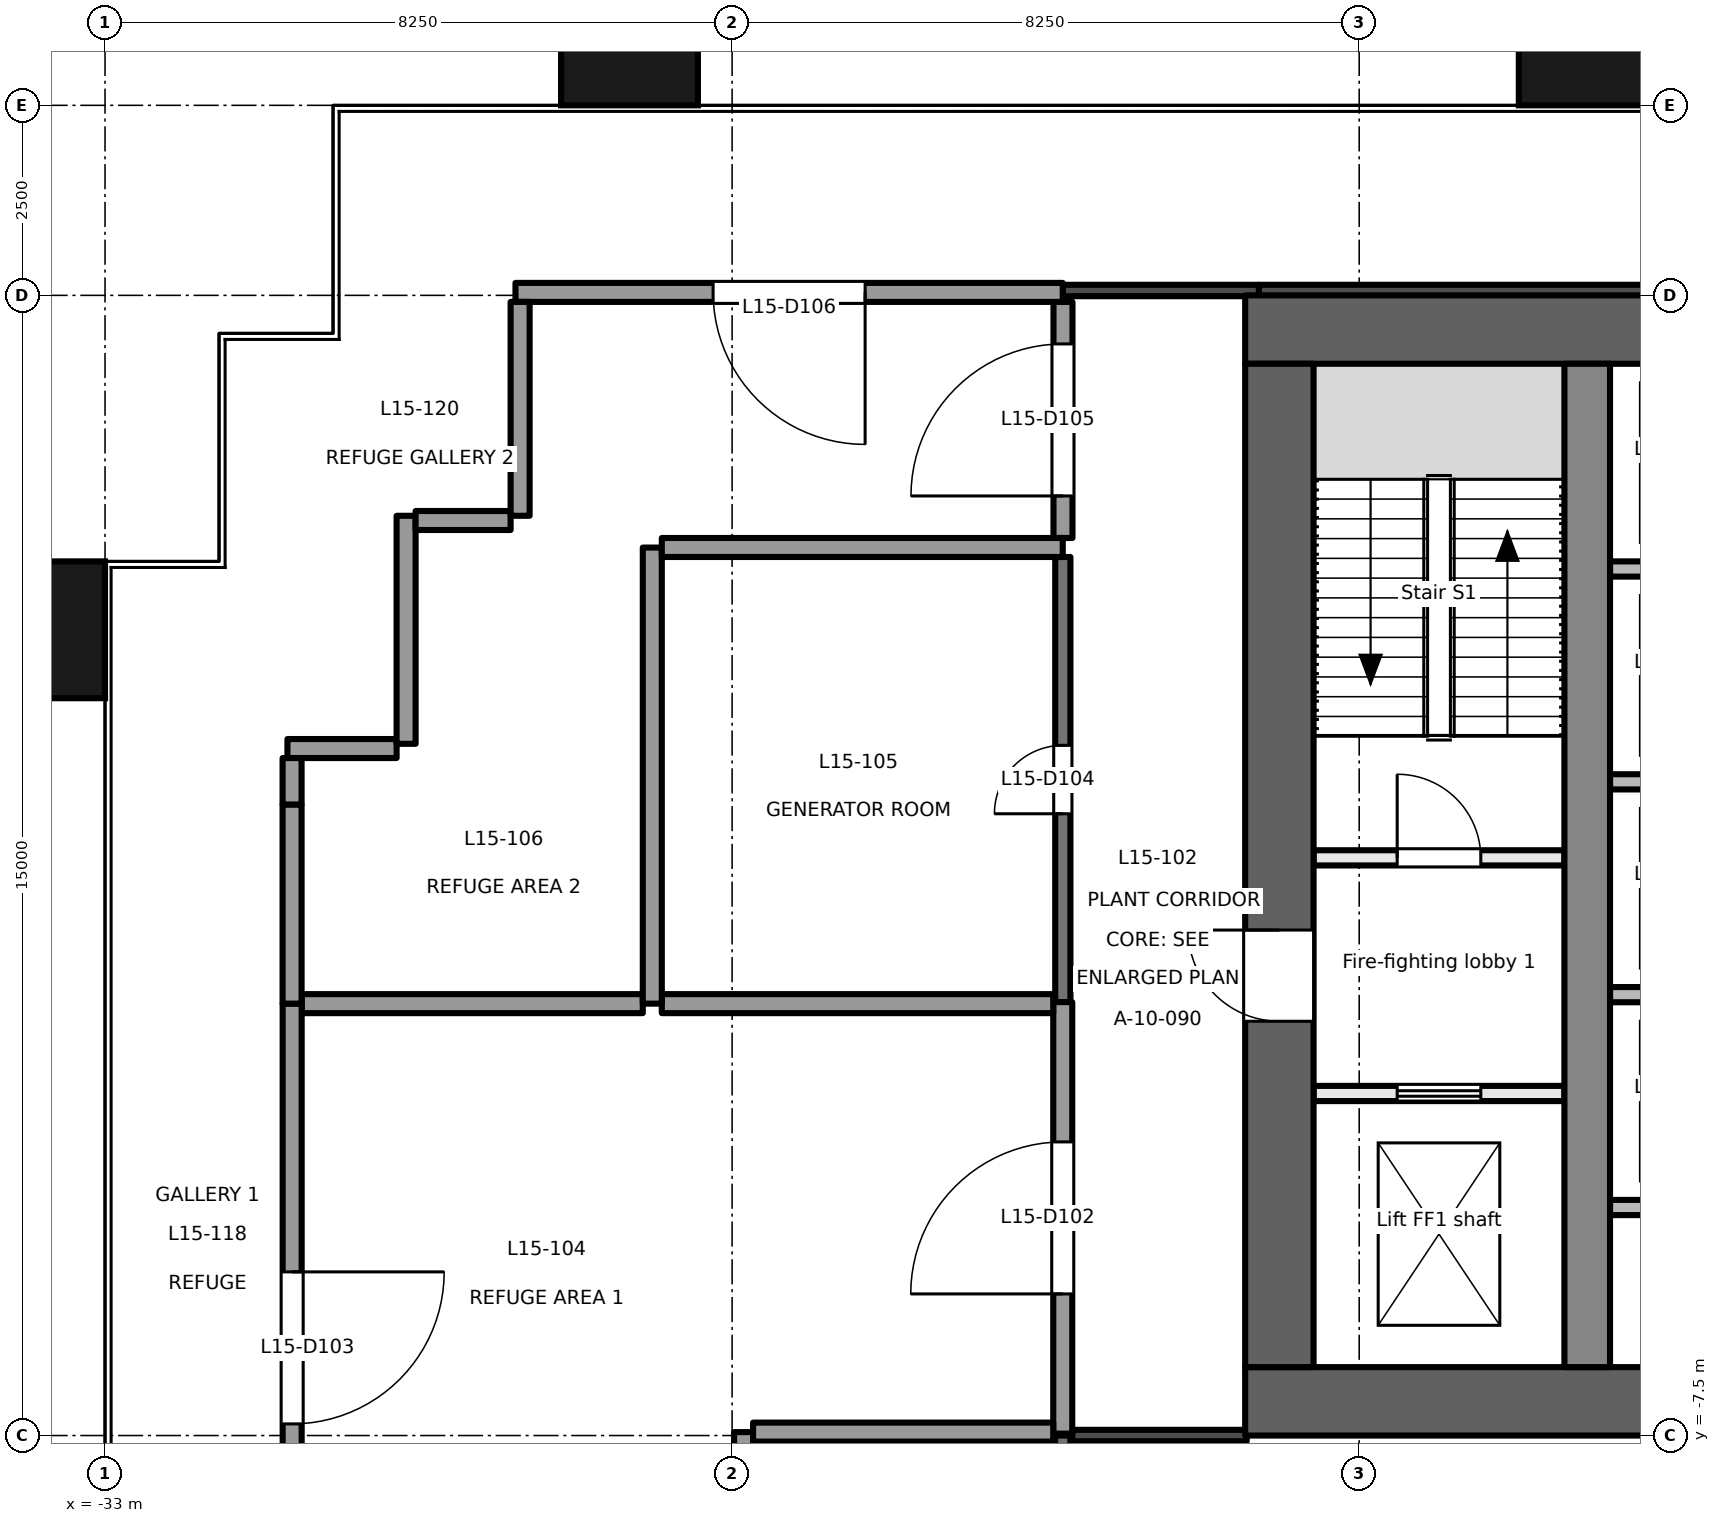
"""IFC4 building model, lengths in metres.
Left out: names, types, materials, properties, quantities, classifications, styles, units other than length and angle.
Written with IfcOpenShell. Run it as: python <this file> out.ifc"""

import sys

from ifc_helpers import new_model, si_unit, direction, frame, frame_2d, origin, origin_2d, place, context, subcontext, project, spatial, rectangle, extrude, element, fill, save


model = new_model("IFC4")
c1 = context("Model", 3, precision=1e-05, world=origin(), true_north=direction((0.0, 1.0)))
c2 = subcontext(c1, "Body", "Model", "MODEL_VIEW")
j1 = project(units=[si_unit("LENGTHUNIT", "METRE"), si_unit("PLANEANGLEUNIT", "RADIAN")], contexts=[c1])
p1 = place(None, origin())
s1 = spatial("IfcSite", under=j1, at=p1, CompositionType="ELEMENT")
p2 = place(p1, origin())
s2 = spatial("IfcBuilding", under=s1, at=p2, CompositionType="ELEMENT")
p3 = place(p2, frame((0.0, 0.0, 69.3)))
s3 = spatial("IfcBuildingStorey", under=s2, at=p3, CompositionType="ELEMENT", Elevation=69.3)
for number, where, z_axis, x_axis in (
    (1, (-33.9, 3.1, -0.2), (0.0, 0.0, 1.0), (0.0, 1.0, 0.0)),
    (2, (-26.1, 10.9, -0.2), (0.0, 0.0, 1.0), (1.0, 0.0, 0.0)),
    (3, (-13.5, 10.9, -0.2), (0.0, 0.0, 1.0), (1.0, 0.0, 0.0)),
):
    element("IfcColumn", number, at=place(p3, frame(where, z_axis=z_axis, x_axis=x_axis)), inside=s3, PredefinedType="COLUMN", context=c2, shape_type="SweptSolid", body=[
        extrude(rectangle(XDim=1.8, YDim=1.8, at=origin_2d()), origin(), (0.0, 0.0, 1.0), 5.0),
    ])
p4 = place(p3, frame((-18.0, -7.05, -0.2), z_axis=(0.0, 0.0, 1.0), x_axis=(1.0, 0.0, 0.0)))
e4 = element("IfcWall", 4, at=p4, inside=s3, PredefinedType="SHEAR", context=c2, shape_type="SweptSolid", body=[
    extrude(rectangle(XDim=36.0, YDim=0.9, at=frame_2d((18.0, 0.0))), origin(), (0.0, 0.0, 1.0), 5.0),
])
p5 = place(p4, frame((7.8, 0.0, 0.2)))
e5 = element("IfcOpeningElement", 5, at=p5, cuts=e4, PredefinedType="OPENING", context=c2, shape_type="SweptSolid", body=[
    extrude(rectangle(XDim=2.4, YDim=2.1, at=frame_2d((1.2, 1.05))), frame((0.0, 0.46, 0.0), z_axis=(0.0, -1.0, 0.0), x_axis=(1.0, 0.0, 0.0)), (0.0, 0.0, 1.0), 0.921),
])
p6 = place(p4, frame((17.4, 0.0, 0.2)))
e6 = element("IfcOpeningElement", 6, at=p6, cuts=e4, PredefinedType="OPENING", context=c2, shape_type="SweptSolid", body=[
    extrude(rectangle(XDim=1.2, YDim=2.1, at=frame_2d((0.6, 1.05))), frame((0.0, 0.46, 0.0), z_axis=(0.0, -1.0, 0.0), x_axis=(1.0, 0.0, 0.0)), (0.0, 0.0, 1.0), 0.921),
])
p7 = place(p4, frame((26.1, 0.0, 0.2)))
e7 = element("IfcOpeningElement", 7, at=p7, cuts=e4, PredefinedType="OPENING", context=c2, shape_type="SweptSolid", body=[
    extrude(rectangle(XDim=2.4, YDim=2.1, at=frame_2d((1.2, 1.05))), frame((0.0, 0.46, 0.0), z_axis=(0.0, -1.0, 0.0), x_axis=(1.0, 0.0, 0.0)), (0.0, 0.0, 1.0), 0.921),
])
p8 = place(p3, frame((-18.0, 7.05, -0.2), z_axis=(0.0, 0.0, 1.0), x_axis=(1.0, 0.0, 0.0)))
e8 = element("IfcWall", 8, at=p8, inside=s3, PredefinedType="SHEAR", context=c2, shape_type="SweptSolid", body=[
    extrude(rectangle(XDim=36.0, YDim=0.9, at=frame_2d((18.0, 0.0))), origin(), (0.0, 0.0, 1.0), 5.0),
])
p9 = place(p3, frame((-17.55, -6.6, -0.2), z_axis=(0.0, 0.0, 1.0), x_axis=(0.0, 1.0, 0.0)))
e9 = element("IfcWall", 9, at=p9, inside=s3, PredefinedType="SHEAR", context=c2, shape_type="SweptSolid", body=[
    extrude(rectangle(XDim=13.2, YDim=0.9, at=frame_2d((6.6, 0.0))), origin(), (0.0, 0.0, 1.0), 5.0),
])
p10 = place(p9, frame((4.55, 0.0, 0.2)))
e10 = element("IfcOpeningElement", 10, at=p10, cuts=e9, PredefinedType="OPENING", context=c2, shape_type="SweptSolid", body=[
    extrude(rectangle(XDim=1.2, YDim=2.1, at=frame_2d((0.6, 1.05))), frame((0.0, 0.46, 0.0), z_axis=(0.0, -1.0, 0.0), x_axis=(1.0, 0.0, 0.0)), (0.0, 0.0, 1.0), 0.921),
])
p11 = place(p3, frame((-13.5, -6.6, -0.2), z_axis=(0.0, 0.0, 1.0), x_axis=(0.0, 1.0, 0.0)))
e11 = element("IfcWall", 11, at=p11, inside=s3, PredefinedType="SHEAR", context=c2, shape_type="SweptSolid", body=[
    extrude(rectangle(XDim=13.2, YDim=0.6, at=frame_2d((6.6, 0.0))), origin(), (0.0, 0.0, 1.0), 5.0),
])
p12 = place(p3, frame((-17.1, -3.0, 0.0), z_axis=(0.0, 0.0, 1.0), x_axis=(1.0, 0.0, 0.0)))
e12 = element("IfcWall", 12, at=p12, inside=s3, PredefinedType="PARTITIONING", context=c2, shape_type="SweptSolid", body=[
    extrude(rectangle(XDim=3.3, YDim=0.2, at=frame_2d((1.65, 0.0))), origin(), (0.0, 0.0, 1.0), 4.8),
])
p13 = place(p12, frame((1.1, 0.0, 0.0)))
e13 = element("IfcOpeningElement", 13, at=p13, cuts=e12, PredefinedType="OPENING", context=c2, shape_type="SweptSolid", body=[
    extrude(rectangle(XDim=1.1, YDim=2.1, at=frame_2d((0.55, 1.05))), frame((0.0, 0.111, 0.0), z_axis=(0.0, -1.0, 0.0), x_axis=(1.0, 0.0, 0.0)), (0.0, 0.0, 1.0), 0.221),
])
p14 = place(p3, frame((-17.1, 0.1, 0.0), z_axis=(0.0, 0.0, 1.0), x_axis=(1.0, 0.0, 0.0)))
e14 = element("IfcWall", 14, at=p14, inside=s3, PredefinedType="PARTITIONING", context=c2, shape_type="SweptSolid", body=[
    extrude(rectangle(XDim=3.3, YDim=0.2, at=frame_2d((1.65, 0.0))), origin(), (0.0, 0.0, 1.0), 4.8),
])
p15 = place(p14, frame((1.1, 0.0, 0.0)))
e15 = element("IfcOpeningElement", 15, at=p15, cuts=e14, PredefinedType="OPENING", context=c2, shape_type="SweptSolid", body=[
    extrude(rectangle(XDim=1.1, YDim=2.1, at=frame_2d((0.55, 1.05))), frame((0.0, 0.111, 0.0), z_axis=(0.0, -1.0, 0.0), x_axis=(1.0, 0.0, 0.0)), (0.0, 0.0, 1.0), 0.221),
])
for number, where, z_axis, x_axis in (
    (16, (-13.2, -1.7, 0.0), (0.0, 0.0, 1.0), (1.0, 0.0, 0.0)),
    (17, (-13.2, 1.1, 0.0), (0.0, 0.0, 1.0), (1.0, 0.0, 0.0)),
    (18, (-13.2, 3.9, 0.0), (0.0, 0.0, 1.0), (1.0, 0.0, 0.0)),
    (19, (-13.2, -4.5, 0.0), (0.0, 0.0, 1.0), (1.0, 0.0, 0.0)),
):
    element("IfcWall", number, at=place(p3, frame(where, z_axis=z_axis, x_axis=x_axis)), inside=s3, PredefinedType="PARTITIONING", context=c2, shape_type="SweptSolid", body=[
        extrude(rectangle(XDim=2.3, YDim=0.2, at=frame_2d((1.15, 0.0))), origin(), (0.0, 0.0, 1.0), 4.8),
    ])
p16 = place(p3, frame((-20.275, -7.5, 0.0), z_axis=(0.0, 0.0, 1.0), x_axis=(1.0, 0.0, 0.0)))
e20 = element("IfcWall", 20, at=p16, inside=s3, PredefinedType="PARTITIONING", context=c2, shape_type="SweptSolid", body=[
    extrude(rectangle(XDim=2.295, YDim=0.15, at=frame_2d((1.147, 0.0))), origin(), (0.0, 0.0, 1.0), 2.15),
])
p17 = place(p3, frame((-20.4, -10.675, 0.0), z_axis=(0.0, 0.0, 1.0), x_axis=(0.0, 1.0, 0.0)))
e21 = element("IfcWall", 21, at=p17, inside=s3, PredefinedType="PARTITIONING", context=c2, shape_type="SweptSolid", body=[
    extrude(rectangle(XDim=3.175, YDim=0.2, at=frame_2d((1.587, 0.0))), origin(), (0.0, 0.0, 1.0), 4.4),
])
p18 = place(p17, frame((1.137, 0.0, 0.0)))
e22 = element("IfcOpeningElement", 22, at=p18, cuts=e21, PredefinedType="OPENING", context=c2, shape_type="SweptSolid", body=[
    extrude(rectangle(XDim=0.9, YDim=2.1, at=frame_2d((0.45, 1.05))), frame((0.0, 0.111, 0.0), z_axis=(0.0, -1.0, 0.0), x_axis=(1.0, 0.0, 0.0)), (0.0, 0.0, 1.0), 0.221),
])
p19 = place(p3, frame((-20.4, -7.475, 0.0), z_axis=(0.0, 0.0, 1.0), x_axis=(0.0, 1.0, 0.0)))
e23 = element("IfcWall", 23, at=p19, inside=s3, PredefinedType="PARTITIONING", context=c2, shape_type="SweptSolid", body=[
    extrude(rectangle(XDim=5.677, YDim=0.25, at=frame_2d((2.838, 0.0))), origin(), (0.0, 0.0, 1.0), 4.4),
])
p20 = place(p19, frame((1.838, 0.0, 0.0)))
e24 = element("IfcOpeningElement", 24, at=p20, cuts=e23, PredefinedType="OPENING", context=c2, shape_type="SweptSolid", body=[
    extrude(rectangle(XDim=2.0, YDim=2.1, at=frame_2d((1.0, 1.05))), frame((0.0, 0.135, 0.0), z_axis=(0.0, -1.0, 0.0), x_axis=(1.0, 0.0, 0.0)), (0.0, 0.0, 1.0), 0.271),
])
p21 = place(p3, frame((-20.399, -1.798, 0.0), z_axis=(0.0, 0.0, 1.0), x_axis=(0.0, 1.0, 0.0)))
e25 = element("IfcWall", 25, at=p21, inside=s3, PredefinedType="PARTITIONING", context=c2, shape_type="SweptSolid", body=[
    extrude(rectangle(XDim=5.856, YDim=0.2, at=frame_2d((2.928, 0.0))), origin(), (0.0, 0.0, 1.0), 2.75),
])
p22 = place(p21, frame((2.478, 0.0, 0.0)))
e26 = element("IfcOpeningElement", 26, at=p22, cuts=e25, PredefinedType="OPENING", context=c2, shape_type="SweptSolid", body=[
    extrude(rectangle(XDim=0.9, YDim=2.1, at=frame_2d((0.45, 1.05))), frame((0.0, 0.111, 0.0), z_axis=(0.0, -1.0, 0.0), x_axis=(1.0, 0.0, 0.0)), (0.0, 0.0, 1.0), 0.221),
])
p23 = place(p3, frame((-20.397, 4.308, 0.0), z_axis=(0.0, 0.0, 1.0), x_axis=(0.0, 1.0, 0.0)))
e27 = element("IfcWall", 27, at=p23, inside=s3, PredefinedType="PARTITIONING", context=c2, shape_type="SweptSolid", body=[
    extrude(rectangle(XDim=3.106, YDim=0.25, at=frame_2d((1.553, 0.0))), origin(), (0.0, 0.0, 1.0), 4.4),
])
p24 = place(p23, frame((0.553, 0.0, 0.0)))
e28 = element("IfcOpeningElement", 28, at=p24, cuts=e27, PredefinedType="OPENING", context=c2, shape_type="SweptSolid", body=[
    extrude(rectangle(XDim=2.0, YDim=2.1, at=frame_2d((1.0, 1.05))), frame((0.0, 0.135, 0.0), z_axis=(0.0, -1.0, 0.0), x_axis=(1.0, 0.0, 0.0)), (0.0, 0.0, 1.0), 0.271),
])
p25 = place(p3, frame((-17.82, 7.564, 0.0), z_axis=(0.0, 0.0, 1.0), x_axis=(1.0, 0.0, 0.0)))
e29 = element("IfcWall", 29, at=p25, inside=s3, PredefinedType="PARTITIONING", context=c2, shape_type="SweptSolid", body=[
    extrude(rectangle(XDim=38.12, YDim=0.15, at=frame_2d((19.06, 0.0))), origin(), (0.0, 0.0, 1.0), 2.75),
])
p26 = place(p3, frame((-20.4, 7.564, 0.0), z_axis=(0.0, 0.0, 1.0), x_axis=(1.0, 0.0, 0.0)))
e30 = element("IfcWall", 30, at=p26, inside=s3, PredefinedType="PARTITIONING", context=c2, shape_type="SweptSolid", body=[
    extrude(rectangle(XDim=2.58, YDim=0.15, at=frame_2d((1.29, 0.0))), origin(), (0.0, 0.0, 1.0), 2.75),
])
p27 = place(p3, frame((-24.599, -13.329, 0.0), z_axis=(0.0, 0.0, 1.0), x_axis=(0.0, 1.0, 0.0)))
e31 = element("IfcWall", 31, at=p27, inside=s3, PredefinedType="PARTITIONING", context=c2, shape_type="SweptSolid", body=[
    extrude(rectangle(XDim=5.874, YDim=0.25, at=frame_2d((2.937, 0.0))), origin(), (0.0, 0.0, 1.0), 2.75),
])
p28 = place(p3, frame((-24.474, -7.455, 0.0), z_axis=(0.0, 0.0, 1.0), x_axis=(1.0, 0.0, 0.0)))
e32 = element("IfcWall", 32, at=p28, inside=s3, PredefinedType="PARTITIONING", context=c2, shape_type="SweptSolid", body=[
    extrude(rectangle(XDim=3.949, YDim=0.25, at=frame_2d((1.975, 0.0))), origin(), (0.0, 0.0, 1.0), 4.8),
])
p29 = place(p3, frame((-25.675, -1.818, 0.0), z_axis=(0.0, 0.0, 1.0), x_axis=(1.0, 0.0, 0.0)))
e33 = element("IfcWall", 33, at=p29, inside=s3, PredefinedType="PARTITIONING", context=c2, shape_type="SweptSolid", body=[
    extrude(rectangle(XDim=5.15, YDim=0.25, at=frame_2d((2.575, 0.0))), origin(), (0.0, 0.0, 1.0), 4.8),
])
p30 = place(p3, frame((-30.413, -1.818, 0.0), z_axis=(0.0, 0.0, 1.0), x_axis=(1.0, 0.0, 0.0)))
e34 = element("IfcWall", 34, at=p30, inside=s3, PredefinedType="PARTITIONING", context=c2, shape_type="SweptSolid", body=[
    extrude(rectangle(XDim=4.488, YDim=0.25, at=frame_2d((2.244, 0.0))), origin(), (0.0, 0.0, 1.0), 3.7),
])
p31 = place(p3, frame((-30.538, -1.818, 0.0), z_axis=(0.0, 0.0, 1.0), x_axis=(0.0, -1.0, 0.0)))
e35 = element("IfcWall", 35, at=p31, inside=s3, PredefinedType="PARTITIONING", context=c2, shape_type="SweptSolid", body=[
    extrude(rectangle(XDim=9.057, YDim=0.25, at=frame_2d((4.528, 0.0))), origin(), (0.0, 0.0, 1.0), 4.8),
])
p32 = place(p31, frame((3.529, 0.0, 0.0)))
e36 = element("IfcOpeningElement", 36, at=p32, cuts=e35, PredefinedType="OPENING", context=c2, shape_type="SweptSolid", body=[
    extrude(rectangle(XDim=2.0, YDim=2.1, at=frame_2d((1.0, 1.05))), frame((0.0, 0.135, 0.0), z_axis=(0.0, -1.0, 0.0), x_axis=(1.0, 0.0, 0.0)), (0.0, 0.0, 1.0), 0.271),
])
p33 = place(p3, frame((-25.8, -1.818, 0.0), z_axis=(0.0, 0.0, 1.0), x_axis=(0.0, 1.0, 0.0)))
e37 = element("IfcWall", 37, at=p33, inside=s3, PredefinedType="PARTITIONING", context=c2, shape_type="SweptSolid", body=[
    extrude(rectangle(XDim=6.0, YDim=0.25, at=frame_2d((3.0, 0.0))), origin(), (0.0, 0.0, 1.0), 2.75),
])
p34 = place(p3, frame((-25.675, 4.183, 0.0), z_axis=(0.0, 0.0, 1.0), x_axis=(1.0, 0.0, 0.0)))
e38 = element("IfcWall", 38, at=p34, inside=s3, PredefinedType="PARTITIONING", context=c2, shape_type="SweptSolid", body=[
    extrude(rectangle(XDim=5.275, YDim=0.25, at=frame_2d((2.638, 0.0))), origin(), (0.0, 0.0, 1.0), 4.8),
])
p35 = place(p3, frame((-30.539, -1.818, 0.0), z_axis=(0.0, 0.0, 1.0), x_axis=(0.0, 1.0, 0.0)))
e39 = element("IfcWall", 39, at=p35, inside=s3, PredefinedType="PARTITIONING", context=c2, shape_type="SweptSolid", body=[
    extrude(rectangle(XDim=2.62, YDim=0.25, at=frame_2d((1.31, 0.0))), origin(), (0.0, 0.0, 1.0), 4.8),
])
p36 = place(p3, frame((-30.6, 1.538, 0.0), z_axis=(0.0, 0.0, 1.0), x_axis=(1.0, 0.0, 0.0)))
e40 = element("IfcWall", 40, at=p36, inside=s3, PredefinedType="PARTITIONING", context=c2, shape_type="SweptSolid", body=[
    extrude(rectangle(XDim=1.436, YDim=0.25, at=frame_2d((0.718, 0.0))), origin(), (0.0, 0.0, 1.0), 4.8),
])
p37 = place(p3, frame((-30.539, 0.802, 0.0), z_axis=(0.0, 0.0, 1.0), x_axis=(0.0, 1.0, 0.0)))
e41 = element("IfcWall", 41, at=p37, inside=s3, PredefinedType="PARTITIONING", context=c2, shape_type="SweptSolid", body=[
    extrude(rectangle(XDim=0.611, YDim=0.25, at=frame_2d((0.306, 0.0))), origin(), (0.0, 0.0, 1.0), 4.8),
])
p38 = place(p3, frame((-29.039, 1.6, 0.0), z_axis=(0.0, 0.0, 1.0), x_axis=(0.0, 1.0, 0.0)))
e42 = element("IfcWall", 42, at=p38, inside=s3, PredefinedType="PARTITIONING", context=c2, shape_type="SweptSolid", body=[
    extrude(rectangle(XDim=3.0, YDim=0.25, at=frame_2d((1.5, 0.0))), origin(), (0.0, 0.0, 1.0), 2.75),
])
p39 = place(p3, frame((-28.914, 4.538, 0.0), z_axis=(0.0, 0.0, 1.0), x_axis=(1.0, 0.0, 0.0)))
e43 = element("IfcWall", 43, at=p39, inside=s3, PredefinedType="PARTITIONING", context=c2, shape_type="SweptSolid", body=[
    extrude(rectangle(XDim=1.25, YDim=0.25, at=frame_2d((0.625, 0.0))), origin(), (0.0, 0.0, 1.0), 4.8),
])
p40 = place(p3, frame((-20.4, 7.539, 0.0), z_axis=(0.0, 0.0, 1.0), x_axis=(-1.0, 0.0, 0.0)))
e44 = element("IfcWall", 44, at=p40, inside=s3, PredefinedType="PARTITIONING", context=c2, shape_type="SweptSolid", body=[
    extrude(rectangle(XDim=7.2, YDim=0.25, at=frame_2d((3.6, 0.0))), origin(), (0.0, 0.0, 1.0), 4.8),
])
p41 = place(p40, frame((2.6, 0.0, 0.0)))
e45 = element("IfcOpeningElement", 45, at=p41, cuts=e44, PredefinedType="OPENING", context=c2, shape_type="SweptSolid", body=[
    extrude(rectangle(XDim=2.0, YDim=2.1, at=frame_2d((1.0, 1.05))), frame((0.0, 0.135, 0.0), z_axis=(0.0, -1.0, 0.0), x_axis=(1.0, 0.0, 0.0)), (0.0, 0.0, 1.0), 0.271),
])
p42 = place(p3, frame((-27.539, 4.6, 0.0), z_axis=(0.0, 0.0, 1.0), x_axis=(0.0, 1.0, 0.0)))
e46 = element("IfcWall", 46, at=p42, inside=s3, PredefinedType="PARTITIONING", context=c2, shape_type="SweptSolid", body=[
    extrude(rectangle(XDim=2.814, YDim=0.25, at=frame_2d((1.407, 0.0))), origin(), (0.0, 0.0, 1.0), 4.8),
])
p43 = place(p13, origin())
e47 = element("IfcDoor", 47, at=p43, inside=s3, OperationType="DOUBLE_DOOR_SLIDING", PredefinedType="DOOR", context=c2, shape_type="SweptSolid", body=[
    extrude(rectangle(XDim=1.1, YDim=2.1, at=frame_2d((0.55, 1.05))), frame((0.0, 0.025, 0.0), z_axis=(0.0, -1.0, 0.0), x_axis=(1.0, 0.0, 0.0)), (0.0, 0.0, 1.0), 0.05),
])
fill(e13, e47)
p44 = place(p10, origin())
e48 = element("IfcDoor", 48, at=p44, inside=s3, OperationType="SINGLE_SWING_RIGHT", PredefinedType="DOOR", context=c2, shape_type="SweptSolid", body=[
    extrude(rectangle(XDim=1.2, YDim=2.1, at=frame_2d((0.6, 1.05))), frame((0.0, 0.025, 0.0), z_axis=(0.0, -1.0, 0.0), x_axis=(1.0, 0.0, 0.0)), (0.0, 0.0, 1.0), 0.05),
])
fill(e10, e48)
p45 = place(p15, origin())
e49 = element("IfcDoor", 49, at=p45, inside=s3, OperationType="SINGLE_SWING_LEFT", PredefinedType="DOOR", context=c2, shape_type="SweptSolid", body=[
    extrude(rectangle(XDim=1.1, YDim=2.1, at=frame_2d((0.55, 1.05))), frame((0.0, 0.025, 0.0), z_axis=(0.0, -1.0, 0.0), x_axis=(1.0, 0.0, 0.0)), (0.0, 0.0, 1.0), 0.05),
])
fill(e15, e49)
p46 = place(p20, origin())
e50 = element("IfcDoor", 50, at=p46, inside=s3, OperationType="DOUBLE_DOOR_SINGLE_SWING", PredefinedType="DOOR", context=c2, shape_type="SweptSolid", body=[
    extrude(rectangle(XDim=2.0, YDim=2.1, at=frame_2d((1.0, 1.05))), frame((0.0, 0.025, 0.0), z_axis=(0.0, -1.0, 0.0), x_axis=(1.0, 0.0, 0.0)), (0.0, 0.0, 1.0), 0.05),
])
fill(e24, e50)
p47 = place(p32, origin())
e51 = element("IfcDoor", 51, at=p47, inside=s3, OperationType="DOUBLE_DOOR_SINGLE_SWING", PredefinedType="DOOR", context=c2, shape_type="SweptSolid", body=[
    extrude(rectangle(XDim=2.0, YDim=2.1, at=frame_2d((1.0, 1.05))), frame((0.0, 0.025, 0.0), z_axis=(0.0, -1.0, 0.0), x_axis=(1.0, 0.0, 0.0)), (0.0, 0.0, 1.0), 0.05),
])
fill(e36, e51)
p48 = place(p22, origin())
e52 = element("IfcDoor", 52, at=p48, inside=s3, OperationType="SINGLE_SWING_LEFT", PredefinedType="DOOR", context=c2, shape_type="SweptSolid", body=[
    extrude(rectangle(XDim=0.9, YDim=2.1, at=frame_2d((0.45, 1.05))), frame((0.0, 0.025, 0.0), z_axis=(0.0, -1.0, 0.0), x_axis=(1.0, 0.0, 0.0)), (0.0, 0.0, 1.0), 0.05),
])
fill(e26, e52)
p49 = place(p24, origin())
e53 = element("IfcDoor", 53, at=p49, inside=s3, OperationType="DOUBLE_DOOR_SINGLE_SWING", PredefinedType="DOOR", context=c2, shape_type="SweptSolid", body=[
    extrude(rectangle(XDim=2.0, YDim=2.1, at=frame_2d((1.0, 1.05))), frame((0.0, 0.025, 0.0), z_axis=(0.0, -1.0, 0.0), x_axis=(1.0, 0.0, 0.0)), (0.0, 0.0, 1.0), 0.05),
])
fill(e28, e53)
p50 = place(p41, origin())
e54 = element("IfcDoor", 54, at=p50, inside=s3, OperationType="DOUBLE_DOOR_SINGLE_SWING", PredefinedType="DOOR", context=c2, shape_type="SweptSolid", body=[
    extrude(rectangle(XDim=2.0, YDim=2.1, at=frame_2d((1.0, 1.05))), frame((0.0, 0.025, 0.0), z_axis=(0.0, -1.0, 0.0), x_axis=(1.0, 0.0, 0.0)), (0.0, 0.0, 1.0), 0.05),
])
fill(e45, e54)
save(model, sys.argv[1])
